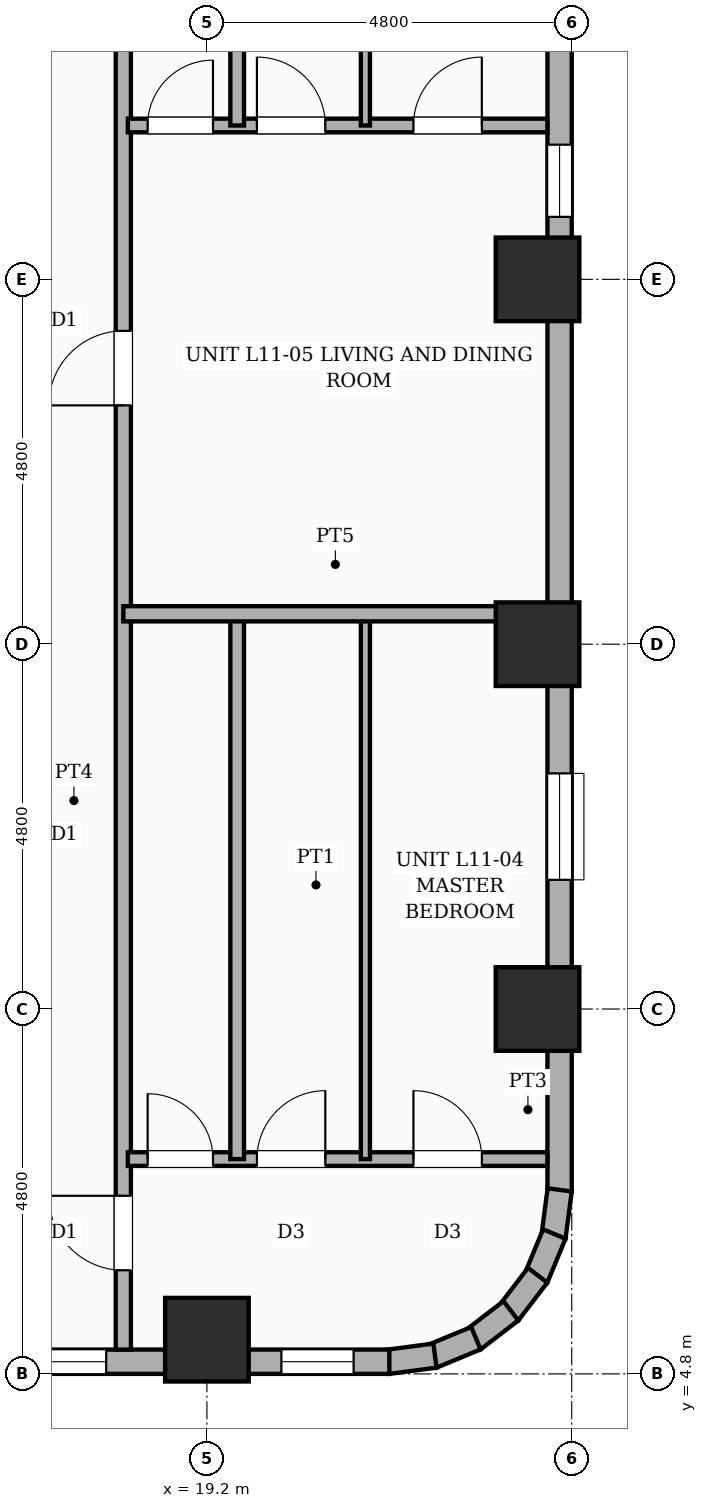
"""IFC4 building model, lengths in metres.
Left out: names, types, materials, properties, quantities, classifications, styles, units other than length and angle.
Written with IfcOpenShell. Run it as: python <this file> out.ifc"""

import sys

from ifc_helpers import new_model, si_unit, direction, frame, frame_2d, origin, origin_2d, place, context, subcontext, project, spatial, rectangle, extrude, element, fill, save


model = new_model("IFC4")
c1 = context("Model", 3, precision=1e-05, world=origin(), true_north=direction((0.0, 1.0)))
c2 = subcontext(c1, "Body", "Model", "MODEL_VIEW")
j1 = project(units=[si_unit("LENGTHUNIT", "METRE"), si_unit("PLANEANGLEUNIT", "RADIAN")], contexts=[c1])
p1 = place(None, origin())
s1 = spatial("IfcSite", under=j1, at=p1, CompositionType="ELEMENT")
p2 = place(p1, origin())
s2 = spatial("IfcBuilding", under=s1, at=p2, CompositionType="ELEMENT")
p3 = place(p2, frame((0.0, 0.0, 46.6)))
s3 = spatial("IfcBuildingStorey", under=s2, at=p3, CompositionType="ELEMENT", Elevation=46.6)
for number, where, z_axis, x_axis in (
    (1, (19.2, 5.25, 0.0), (0.0, 0.0, 1.0), (1.0, 0.0, 0.0)),
    (2, (23.55, 9.6, 0.0), (0.0, 0.0, 1.0), (1.0, 0.0, 0.0)),
    (3, (23.55, 14.4, 0.0), (0.0, 0.0, 1.0), (1.0, 0.0, 0.0)),
    (4, (23.55, 19.2, 0.0), (0.0, 0.0, 1.0), (1.0, 0.0, 0.0)),
):
    element("IfcColumn", number, at=place(p3, frame(where, z_axis=z_axis, x_axis=x_axis)), inside=s3, PredefinedType="COLUMN", context=c2, shape_type="SweptSolid", body=[
        extrude(rectangle(XDim=1.1, YDim=1.1, at=origin_2d()), origin(), (0.0, 0.0, 1.0), 3.6),
    ])
p4 = place(p3, frame((23.84, 26.4, 0.0), z_axis=(0.0, 0.0, 1.0), x_axis=(0.0, -1.0, 0.0)))
e5 = element("IfcWall", 5, at=p4, inside=s3, PredefinedType="STANDARD", context=c2, shape_type="SweptSolid", body=[
    extrude(rectangle(XDim=19.2, YDim=0.32, at=frame_2d((9.6, 0.0))), origin(), (0.0, 0.0, 1.0), 2.53),
])
p5 = place(p4, frame((13.7, 0.0, 0.65)))
e6 = element("IfcOpeningElement", 6, at=p5, cuts=e5, PredefinedType="OPENING", context=c2, shape_type="SweptSolid", body=[
    extrude(rectangle(XDim=1.4, YDim=1.1, at=frame_2d((0.7, 0.55))), frame((0.0, 0.17, 0.0), z_axis=(0.0, -1.0, 0.0), x_axis=(1.0, 0.0, 0.0)), (0.0, 0.0, 1.0), 0.34),
])
p6 = place(p4, frame((0.88, 0.0, 0.45)))
e7 = element("IfcOpeningElement", 7, at=p6, cuts=e5, PredefinedType="OPENING", context=c2, shape_type="SweptSolid", body=[
    extrude(rectangle(XDim=0.75, YDim=1.8, at=frame_2d((0.375, 0.9))), frame((0.0, 0.17, 0.0), z_axis=(0.0, -1.0, 0.0), x_axis=(1.0, 0.0, 0.0)), (0.0, 0.0, 1.0), 0.34),
])
p7 = place(p4, frame((5.428, 0.0, 0.45)))
e8 = element("IfcOpeningElement", 8, at=p7, cuts=e5, PredefinedType="OPENING", context=c2, shape_type="SweptSolid", body=[
    extrude(rectangle(XDim=0.95, YDim=1.8, at=frame_2d((0.475, 0.9))), frame((0.0, 0.17, 0.0), z_axis=(0.0, -1.0, 0.0), x_axis=(1.0, 0.0, 0.0)), (0.0, 0.0, 1.0), 0.34),
])
p8 = place(p3, frame((23.841, 7.221, 0.0), z_axis=(0.0, 0.0, 1.0), x_axis=(-0.130504898859, -0.991447664465, 0.0)))
e9 = element("IfcWall", 9, at=p8, inside=s3, PredefinedType="STANDARD", context=c2, shape_type="SweptSolid", body=[
    extrude(rectangle(XDim=0.627, YDim=0.32, at=frame_2d((0.313, 0.0))), origin(), (0.0, 0.0, 1.0), 3.35),
])
p9 = place(p3, frame((23.771, 6.64, 0.0), z_axis=(0.0, 0.0, 1.0), x_axis=(-0.382787856107, -0.923836271867, 0.0)))
e10 = element("IfcWall", 10, at=p9, inside=s3, PredefinedType="STANDARD", context=c2, shape_type="SweptSolid", body=[
    extrude(rectangle(XDim=0.626, YDim=0.32, at=frame_2d((0.313, 0.0))), origin(), (0.0, 0.0, 1.0), 3.35),
])
p10 = place(p3, frame((23.552, 6.097, 0.0), z_axis=(0.0, 0.0, 1.0), x_axis=(-0.608693302629, -0.793405610854, 0.0)))
e11 = element("IfcWall", 11, at=p10, inside=s3, PredefinedType="STANDARD", context=c2, shape_type="SweptSolid", body=[
    extrude(rectangle(XDim=0.626, YDim=0.32, at=frame_2d((0.313, 0.0))), origin(), (0.0, 0.0, 1.0), 3.35),
])
p11 = place(p3, frame((23.2, 5.63, 0.0), z_axis=(0.0, 0.0, 1.0), x_axis=(-0.7932174212, -0.608938521285, 0.0)))
e12 = element("IfcWall", 12, at=p11, inside=s3, PredefinedType="STANDARD", context=c2, shape_type="SweptSolid", body=[
    extrude(rectangle(XDim=0.627, YDim=0.32, at=frame_2d((0.313, 0.0))), origin(), (0.0, 0.0, 1.0), 3.35),
])
for number, where, z_axis, x_axis in (
    (13, (22.739, 5.269, 0.0), (0.0, 0.0, 1.0), (-0.924, -0.383, 0.0)),
    (14, (22.2, 5.04, 0.0), (0.0, 0.0, 1.0), (-0.991, -0.131, 0.0)),
):
    element("IfcWall", number, at=place(p3, frame(where, z_axis=z_axis, x_axis=x_axis)), inside=s3, PredefinedType="STANDARD", context=c2, shape_type="SweptSolid", body=[
        extrude(rectangle(XDim=0.626, YDim=0.32, at=frame_2d((0.313, 0.0))), origin(), (0.0, 0.0, 1.0), 3.35),
    ])
p12 = place(p3, frame((21.6, 4.96, 0.0), z_axis=(0.0, 0.0, 1.0), x_axis=(-1.0, 0.0, 0.0)))
e15 = element("IfcWall", 15, at=p12, inside=s3, PredefinedType="STANDARD", context=c2, shape_type="SweptSolid", body=[
    extrude(rectangle(XDim=14.4, YDim=0.32, at=frame_2d((7.2, 0.0))), origin(), (0.0, 0.0, 1.0), 2.53),
])
p13 = place(p12, frame((5.615, 0.0, 0.45)))
e16 = element("IfcOpeningElement", 16, at=p13, cuts=e15, PredefinedType="OPENING", context=c2, shape_type="SweptSolid", body=[
    extrude(rectangle(XDim=0.75, YDim=1.8, at=frame_2d((0.375, 0.9))), frame((0.0, 0.17, 0.0), z_axis=(0.0, -1.0, 0.0), x_axis=(1.0, 0.0, 0.0)), (0.0, 0.0, 1.0), 0.34),
])
p14 = place(p12, frame((3.725, 0.0, 0.65)))
e17 = element("IfcOpeningElement", 17, at=p14, cuts=e15, PredefinedType="OPENING", context=c2, shape_type="SweptSolid", body=[
    extrude(rectangle(XDim=1.4, YDim=1.1, at=frame_2d((0.7, 0.55))), frame((0.0, 0.17, 0.0), z_axis=(0.0, -1.0, 0.0), x_axis=(1.0, 0.0, 0.0)), (0.0, 0.0, 1.0), 0.34),
])
p15 = place(p12, frame((0.47, 0.0, 0.45)))
e18 = element("IfcOpeningElement", 18, at=p15, cuts=e15, PredefinedType="OPENING", context=c2, shape_type="SweptSolid", body=[
    extrude(rectangle(XDim=0.95, YDim=1.8, at=frame_2d((0.475, 0.9))), frame((0.0, 0.17, 0.0), z_axis=(0.0, -1.0, 0.0), x_axis=(1.0, 0.0, 0.0)), (0.0, 0.0, 1.0), 0.34),
])
p16 = place(p3, frame((18.1, 5.12, 0.0), z_axis=(0.0, 0.0, 1.0), x_axis=(0.0, 1.0, 0.0)))
e19 = element("IfcWall", 19, at=p16, inside=s3, PredefinedType="PARTITIONING", context=c2, shape_type="SweptSolid", body=[
    extrude(rectangle(XDim=20.63, YDim=0.2, at=frame_2d((10.315, 0.0))), origin(), (0.0, 0.0, 1.0), 3.35),
])
p17 = place(p16, frame((1.043, 0.0, 0.0)))
e20 = element("IfcOpeningElement", 20, at=p17, cuts=e19, PredefinedType="OPENING", context=c2, shape_type="SweptSolid", body=[
    extrude(rectangle(XDim=0.98, YDim=2.18, at=frame_2d((0.49, 1.09))), frame((0.0, 0.11, 0.0), z_axis=(0.0, -1.0, 0.0), x_axis=(1.0, 0.0, 0.0)), (0.0, 0.0, 1.0), 0.22),
])
p18 = place(p16, frame((12.422, 0.0, 0.0)))
e21 = element("IfcOpeningElement", 21, at=p18, cuts=e19, PredefinedType="OPENING", context=c2, shape_type="SweptSolid", body=[
    extrude(rectangle(XDim=0.98, YDim=2.18, at=frame_2d((0.49, 1.09))), frame((0.0, 0.11, 0.0), z_axis=(0.0, -1.0, 0.0), x_axis=(1.0, 0.0, 0.0)), (0.0, 0.0, 1.0), 0.22),
])
p19 = place(p3, frame((18.16, 7.626, 0.0), z_axis=(0.0, 0.0, 1.0), x_axis=(1.0, 0.0, 0.0)))
e22 = element("IfcWall", 22, at=p19, inside=s3, PredefinedType="PLUMBINGWALL", context=c2, shape_type="SweptSolid", body=[
    extrude(rectangle(XDim=5.52, YDim=0.18, at=frame_2d((2.76, 0.0))), origin(), (0.0, 0.0, 1.0), 3.35),
])
p20 = place(p19, frame((0.26, 0.0, 0.0)))
e23 = element("IfcOpeningElement", 23, at=p20, cuts=e22, PredefinedType="OPENING", context=c2, shape_type="SweptSolid", body=[
    extrude(rectangle(XDim=0.86, YDim=2.1, at=frame_2d((0.43, 1.05))), frame((0.0, 0.1, 0.0), z_axis=(0.0, -1.0, 0.0), x_axis=(1.0, 0.0, 0.0)), (0.0, 0.0, 1.0), 0.2),
])
p21 = place(p19, frame((1.698, 0.0, 0.0)))
e24 = element("IfcOpeningElement", 24, at=p21, cuts=e22, PredefinedType="OPENING", context=c2, shape_type="SweptSolid", body=[
    extrude(rectangle(XDim=0.9, YDim=2.15, at=frame_2d((0.45, 1.075))), frame((0.0, 0.1, 0.0), z_axis=(0.0, -1.0, 0.0), x_axis=(1.0, 0.0, 0.0)), (0.0, 0.0, 1.0), 0.2),
])
p22 = place(p19, frame((3.757, 0.0, 0.0)))
e25 = element("IfcOpeningElement", 25, at=p22, cuts=e22, PredefinedType="OPENING", context=c2, shape_type="SweptSolid", body=[
    extrude(rectangle(XDim=0.9, YDim=2.15, at=frame_2d((0.45, 1.075))), frame((0.0, 0.1, 0.0), z_axis=(0.0, -1.0, 0.0), x_axis=(1.0, 0.0, 0.0)), (0.0, 0.0, 1.0), 0.2),
])
p23 = place(p3, frame((19.598, 7.626, 0.0), z_axis=(0.0, 0.0, 1.0), x_axis=(0.0, 1.0, 0.0)))
e26 = element("IfcWall", 26, at=p23, inside=s3, PredefinedType="PLUMBINGWALL", context=c2, shape_type="SweptSolid", body=[
    extrude(rectangle(XDim=7.214, YDim=0.18, at=frame_2d((3.607, 0.0))), origin(), (0.0, 0.0, 1.0), 3.35),
])
p24 = place(p3, frame((21.285, 7.626, 0.0), z_axis=(0.0, 0.0, 1.0), x_axis=(0.0, 1.0, 0.0)))
e27 = element("IfcWall", 27, at=p24, inside=s3, PredefinedType="PARTITIONING", context=c2, shape_type="SweptSolid", body=[
    extrude(rectangle(XDim=7.214, YDim=0.12, at=frame_2d((3.607, 0.0))), origin(), (0.0, 0.0, 1.0), 3.35),
])
p25 = place(p3, frame((18.1, 14.8, 0.0), z_axis=(0.0, 0.0, 1.0), x_axis=(1.0, 0.0, 0.0)))
e28 = element("IfcWall", 28, at=p25, inside=s3, PredefinedType="SOLIDWALL", context=c2, shape_type="SweptSolid", body=[
    extrude(rectangle(XDim=5.58, YDim=0.2, at=frame_2d((2.79, 0.0))), origin(), (0.0, 0.0, 1.0), 3.35),
])
p26 = place(p3, frame((18.16, 21.224, 0.0), z_axis=(0.0, 0.0, 1.0), x_axis=(1.0, 0.0, 0.0)))
e29 = element("IfcWall", 29, at=p26, inside=s3, PredefinedType="PLUMBINGWALL", context=c2, shape_type="SweptSolid", body=[
    extrude(rectangle(XDim=5.52, YDim=0.18, at=frame_2d((2.76, 0.0))), origin(), (0.0, 0.0, 1.0), 3.35),
])
p27 = place(p26, frame((0.26, 0.0, 0.0)))
e30 = element("IfcOpeningElement", 30, at=p27, cuts=e29, PredefinedType="OPENING", context=c2, shape_type="SweptSolid", body=[
    extrude(rectangle(XDim=0.86, YDim=2.1, at=frame_2d((0.43, 1.05))), frame((0.0, 0.1, 0.0), z_axis=(0.0, -1.0, 0.0), x_axis=(1.0, 0.0, 0.0)), (0.0, 0.0, 1.0), 0.2),
])
p28 = place(p26, frame((1.698, 0.0, 0.0)))
e31 = element("IfcOpeningElement", 31, at=p28, cuts=e29, PredefinedType="OPENING", context=c2, shape_type="SweptSolid", body=[
    extrude(rectangle(XDim=0.9, YDim=2.15, at=frame_2d((0.45, 1.075))), frame((0.0, 0.1, 0.0), z_axis=(0.0, -1.0, 0.0), x_axis=(1.0, 0.0, 0.0)), (0.0, 0.0, 1.0), 0.2),
])
p29 = place(p26, frame((3.757, 0.0, 0.0)))
e32 = element("IfcOpeningElement", 32, at=p29, cuts=e29, PredefinedType="OPENING", context=c2, shape_type="SweptSolid", body=[
    extrude(rectangle(XDim=0.9, YDim=2.15, at=frame_2d((0.45, 1.075))), frame((0.0, 0.1, 0.0), z_axis=(0.0, -1.0, 0.0), x_axis=(1.0, 0.0, 0.0)), (0.0, 0.0, 1.0), 0.2),
])
p30 = place(p3, frame((19.598, 21.224, 0.0), z_axis=(0.0, 0.0, 1.0), x_axis=(0.0, 1.0, 0.0)))
e33 = element("IfcWall", 33, at=p30, inside=s3, PredefinedType="PLUMBINGWALL", context=c2, shape_type="SweptSolid", body=[
    extrude(rectangle(XDim=4.496, YDim=0.18, at=frame_2d((2.248, 0.0))), origin(), (0.0, 0.0, 1.0), 3.35),
])
p31 = place(p3, frame((21.285, 21.224, 0.0), z_axis=(0.0, 0.0, 1.0), x_axis=(0.0, 1.0, 0.0)))
e34 = element("IfcWall", 34, at=p31, inside=s3, PredefinedType="PARTITIONING", context=c2, shape_type="SweptSolid", body=[
    extrude(rectangle(XDim=4.496, YDim=0.12, at=frame_2d((2.248, 0.0))), origin(), (0.0, 0.0, 1.0), 3.35),
])
p32 = place(p5, origin())
e35 = element("IfcWindow", 35, at=p32, inside=s3, PartitioningType="SINGLE_PANEL", PredefinedType="WINDOW", context=c2, shape_type="SweptSolid", body=[
    extrude(rectangle(XDim=1.4, YDim=1.1, at=frame_2d((0.7, 0.55))), frame((0.0, 0.03, 0.0), z_axis=(0.0, -1.0, 0.0), x_axis=(1.0, 0.0, 0.0)), (0.0, 0.0, 1.0), 0.06),
])
fill(e6, e35)
p33 = place(p7, origin())
e36 = element("IfcWindow", 36, at=p33, inside=s3, PartitioningType="SINGLE_PANEL", PredefinedType="WINDOW", context=c2, shape_type="SweptSolid", body=[
    extrude(rectangle(XDim=0.95, YDim=1.8, at=frame_2d((0.475, 0.9))), frame((0.0, 0.03, 0.0), z_axis=(0.0, -1.0, 0.0), x_axis=(1.0, 0.0, 0.0)), (0.0, 0.0, 1.0), 0.06),
])
fill(e8, e36)
p34 = place(p14, origin())
e37 = element("IfcWindow", 37, at=p34, inside=s3, PartitioningType="SINGLE_PANEL", PredefinedType="WINDOW", context=c2, shape_type="SweptSolid", body=[
    extrude(rectangle(XDim=1.4, YDim=1.1, at=frame_2d((0.7, 0.55))), frame((0.0, 0.03, 0.0), z_axis=(0.0, -1.0, 0.0), x_axis=(1.0, 0.0, 0.0)), (0.0, 0.0, 1.0), 0.06),
])
fill(e17, e37)
p35 = place(p15, origin())
e38 = element("IfcWindow", 38, at=p35, inside=s3, PartitioningType="SINGLE_PANEL", PredefinedType="WINDOW", context=c2, shape_type="SweptSolid", body=[
    extrude(rectangle(XDim=0.95, YDim=1.8, at=frame_2d((0.475, 0.9))), frame((0.0, 0.03, 0.0), z_axis=(0.0, -1.0, 0.0), x_axis=(1.0, 0.0, 0.0)), (0.0, 0.0, 1.0), 0.06),
])
fill(e18, e38)
p36 = place(p17, origin())
e39 = element("IfcDoor", 39, at=p36, inside=s3, OperationType="SINGLE_SWING_RIGHT", PredefinedType="DOOR", context=c2, shape_type="SweptSolid", body=[
    extrude(rectangle(XDim=0.98, YDim=2.18, at=frame_2d((0.49, 1.09))), frame((0.0, 0.025, 0.0), z_axis=(0.0, -1.0, 0.0), x_axis=(1.0, 0.0, 0.0)), (0.0, 0.0, 1.0), 0.05),
])
fill(e20, e39)
p37 = place(p20, origin())
e40 = element("IfcDoor", 40, at=p37, inside=s3, OperationType="SINGLE_SWING_LEFT", PredefinedType="DOOR", context=c2, shape_type="SweptSolid", body=[
    extrude(rectangle(XDim=0.86, YDim=2.1, at=frame_2d((0.43, 1.05))), frame((0.0, 0.025, 0.0), z_axis=(0.0, -1.0, 0.0), x_axis=(1.0, 0.0, 0.0)), (0.0, 0.0, 1.0), 0.05),
])
fill(e23, e40)
p38 = place(p21, origin())
e41 = element("IfcDoor", 41, at=p38, inside=s3, OperationType="SINGLE_SWING_RIGHT", PredefinedType="DOOR", context=c2, shape_type="SweptSolid", body=[
    extrude(rectangle(XDim=0.9, YDim=2.15, at=frame_2d((0.45, 1.075))), frame((0.0, 0.025, 0.0), z_axis=(0.0, -1.0, 0.0), x_axis=(1.0, 0.0, 0.0)), (0.0, 0.0, 1.0), 0.05),
])
fill(e24, e41)
p39 = place(p22, origin())
e42 = element("IfcDoor", 42, at=p39, inside=s3, OperationType="SINGLE_SWING_LEFT", PredefinedType="DOOR", context=c2, shape_type="SweptSolid", body=[
    extrude(rectangle(XDim=0.9, YDim=2.15, at=frame_2d((0.45, 1.075))), frame((0.0, 0.025, 0.0), z_axis=(0.0, -1.0, 0.0), x_axis=(1.0, 0.0, 0.0)), (0.0, 0.0, 1.0), 0.05),
])
fill(e25, e42)
p40 = place(p18, origin())
e43 = element("IfcDoor", 43, at=p40, inside=s3, OperationType="SINGLE_SWING_LEFT", PredefinedType="DOOR", context=c2, shape_type="SweptSolid", body=[
    extrude(rectangle(XDim=0.98, YDim=2.18, at=frame_2d((0.49, 1.09))), frame((0.0, 0.025, 0.0), z_axis=(0.0, -1.0, 0.0), x_axis=(1.0, 0.0, 0.0)), (0.0, 0.0, 1.0), 0.05),
])
fill(e21, e43)
p41 = place(p27, origin())
e44 = element("IfcDoor", 44, at=p41, inside=s3, OperationType="SINGLE_SWING_RIGHT", PredefinedType="DOOR", context=c2, shape_type="SweptSolid", body=[
    extrude(rectangle(XDim=0.86, YDim=2.1, at=frame_2d((0.43, 1.05))), frame((0.0, 0.025, 0.0), z_axis=(0.0, -1.0, 0.0), x_axis=(1.0, 0.0, 0.0)), (0.0, 0.0, 1.0), 0.05),
])
fill(e30, e44)
p42 = place(p28, origin())
e45 = element("IfcDoor", 45, at=p42, inside=s3, OperationType="SINGLE_SWING_LEFT", PredefinedType="DOOR", context=c2, shape_type="SweptSolid", body=[
    extrude(rectangle(XDim=0.9, YDim=2.15, at=frame_2d((0.45, 1.075))), frame((0.0, 0.025, 0.0), z_axis=(0.0, -1.0, 0.0), x_axis=(1.0, 0.0, 0.0)), (0.0, 0.0, 1.0), 0.05),
])
fill(e31, e45)
p43 = place(p29, origin())
e46 = element("IfcDoor", 46, at=p43, inside=s3, OperationType="SINGLE_SWING_RIGHT", PredefinedType="DOOR", context=c2, shape_type="SweptSolid", body=[
    extrude(rectangle(XDim=0.9, YDim=2.15, at=frame_2d((0.45, 1.075))), frame((0.0, 0.025, 0.0), z_axis=(0.0, -1.0, 0.0), x_axis=(1.0, 0.0, 0.0)), (0.0, 0.0, 1.0), 0.05),
])
fill(e32, e46)
save(model, sys.argv[1])
